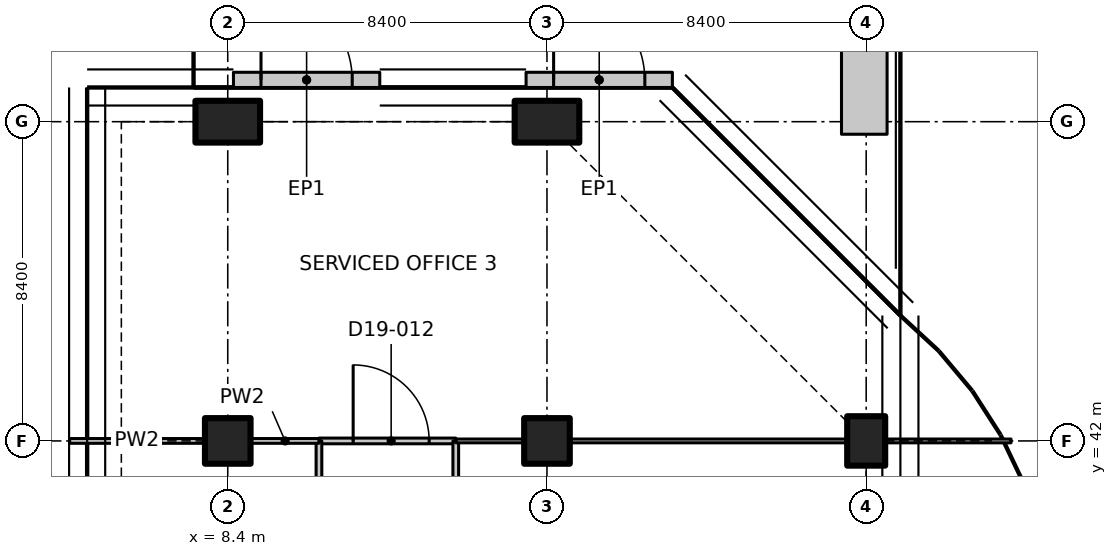
"""IFC4 building model, lengths in metres.
Left out: names, types, materials, properties, quantities, classifications, styles, units other than length and angle.
Written with IfcOpenShell. Run it as: python <this file> out.ifc"""

import sys

from ifc_helpers import new_model, si_unit, direction, frame, frame_2d, origin, origin_2d, place, context, subcontext, project, spatial, polyline, rectangle, outline, extrude, element, fill, save


model = new_model("IFC4")
c1 = context("Model", 3, precision=1e-05, world=origin(), true_north=direction((0.0, 1.0)))
c2 = subcontext(c1, "Body", "Model", "MODEL_VIEW")
j1 = project(units=[si_unit("LENGTHUNIT", "METRE"), si_unit("PLANEANGLEUNIT", "RADIAN")], contexts=[c1])
p1 = place(None, origin())
s1 = spatial("IfcSite", under=j1, at=p1, CompositionType="ELEMENT")
p2 = place(p1, origin())
s2 = spatial("IfcBuilding", under=s1, at=p2, CompositionType="ELEMENT")
p3 = place(p2, frame((0.0, 0.0, 156.5)))
s3 = spatial("IfcBuildingStorey", under=s2, at=p3, CompositionType="ELEMENT", Elevation=156.5)
p4 = place(p3, frame((8.4, 42.0, 0.0), z_axis=(0.0, 0.0, 1.0), x_axis=(1.0, 0.0, 0.0)))
e1 = element("IfcColumn", 1, at=p4, inside=s3, PredefinedType="COLUMN", context=c2, shape_type="SweptSolid", body=[
    extrude(rectangle(XDim=1.2, YDim=1.2, at=origin_2d()), origin(), (0.0, 0.0, 1.0), 5.2),
])
p5 = place(p3, frame((8.4, 50.4, 0.0), z_axis=(0.0, 0.0, 1.0), x_axis=(0.0, 1.0, 0.0)))
e2 = element("IfcColumn", 2, at=p5, inside=s3, PredefinedType="COLUMN", context=c2, shape_type="SweptSolid", body=[
    extrude(rectangle(XDim=1.1, YDim=1.7, at=origin_2d()), origin(), (0.0, 0.0, 1.0), 5.2),
])
p6 = place(p3, frame((16.8, 42.0, 0.0), z_axis=(0.0, 0.0, 1.0), x_axis=(1.0, 0.0, 0.0)))
e3 = element("IfcColumn", 3, at=p6, inside=s3, PredefinedType="COLUMN", context=c2, shape_type="SweptSolid", body=[
    extrude(rectangle(XDim=1.2, YDim=1.2, at=origin_2d()), origin(), (0.0, 0.0, 1.0), 5.2),
])
p7 = place(p3, frame((16.8, 50.4, 0.0), z_axis=(0.0, 0.0, 1.0), x_axis=(0.0, 1.0, 0.0)))
e4 = element("IfcColumn", 4, at=p7, inside=s3, PredefinedType="COLUMN", context=c2, shape_type="SweptSolid", body=[
    extrude(rectangle(XDim=1.1, YDim=1.7, at=origin_2d()), origin(), (0.0, 0.0, 1.0), 5.2),
])
p8 = place(p3, frame((25.2, 42.0, 0.0), z_axis=(0.0, 0.0, 1.0), x_axis=(1.0, 0.0, 0.0)))
e5 = element("IfcColumn", 5, at=p8, inside=s3, PredefinedType="COLUMN", context=c2, shape_type="SweptSolid", body=[
    extrude(rectangle(XDim=1.0, YDim=1.3, at=origin_2d()), origin(), (0.0, 0.0, 1.0), 5.2),
])
p9 = place(p3, frame((16.25, 51.5, 0.0), z_axis=(0.0, 0.0, 1.0), x_axis=(1.0, 0.0, 0.0)))
e6 = element("IfcWall", 6, at=p9, inside=s3, PredefinedType="SOLIDWALL", context=c2, shape_type="SweptSolid", body=[
    extrude(rectangle(XDim=3.85, YDim=0.4, at=frame_2d((1.925, 0.0))), origin(), (0.0, 0.0, 1.0), 5.2),
])
p10 = place(p9, frame((0.725, 0.0, 0.0)))
e7 = element("IfcOpeningElement", 7, at=p10, cuts=e6, PredefinedType="OPENING", context=c2, shape_type="SweptSolid", body=[
    extrude(rectangle(XDim=2.4, YDim=2.7, at=frame_2d((1.2, 1.35))), frame((0.0, 0.21, 0.0), z_axis=(0.0, -1.0, 0.0), x_axis=(1.0, 0.0, 0.0)), (0.0, 0.0, 1.0), 0.42),
])
p11 = place(p3, frame((8.55, 51.5, 0.0), z_axis=(0.0, 0.0, 1.0), x_axis=(1.0, 0.0, 0.0)))
e8 = element("IfcWall", 8, at=p11, inside=s3, PredefinedType="SOLIDWALL", context=c2, shape_type="SweptSolid", body=[
    extrude(rectangle(XDim=3.85, YDim=0.4, at=frame_2d((1.925, 0.0))), origin(), (0.0, 0.0, 1.0), 5.2),
])
p12 = place(p11, frame((0.725, 0.0, 0.0)))
e9 = element("IfcOpeningElement", 9, at=p12, cuts=e8, PredefinedType="OPENING", context=c2, shape_type="SweptSolid", body=[
    extrude(rectangle(XDim=2.4, YDim=2.7, at=frame_2d((1.2, 1.35))), frame((0.0, 0.21, 0.0), z_axis=(0.0, -1.0, 0.0), x_axis=(1.0, 0.0, 0.0)), (0.0, 0.0, 1.0), 0.42),
])
p13 = place(p3, frame((25.15, 50.07, 0.0), z_axis=(0.0, 0.0, 1.0), x_axis=(0.0, 1.0, 0.0)))
e10 = element("IfcWall", 10, at=p13, inside=s3, PredefinedType="PARAPET", context=c2, shape_type="SweptSolid", body=[
    extrude(rectangle(XDim=11.885, YDim=1.2, at=frame_2d((5.943, 0.0))), origin(), (0.0, 0.0, 1.0), 1.3),
])
p14 = place(p3, frame((10.8, 42.0, 0.0), z_axis=(0.0, 0.0, 1.0), x_axis=(1.0, 0.0, 0.0)))
e11 = element("IfcWall", 11, at=p14, inside=s3, PredefinedType="PARTITIONING", context=c2, shape_type="SweptSolid", body=[
    extrude(rectangle(XDim=3.6, YDim=0.15, at=frame_2d((1.8, 0.0))), origin(), (0.0, 0.0, 1.0), 5.18),
])
p15 = place(p14, frame((0.9, 0.0, 0.0)))
e12 = element("IfcOpeningElement", 12, at=p15, cuts=e11, PredefinedType="OPENING", context=c2, shape_type="SweptSolid", body=[
    extrude(rectangle(XDim=2.0, YDim=2.4, at=frame_2d((1.0, 1.2))), frame((0.0, 0.085, 0.0), z_axis=(0.0, -1.0, 0.0), x_axis=(1.0, 0.0, 0.0)), (0.0, 0.0, 1.0), 0.17),
])
p16 = place(p3, frame((10.8, 37.8, 0.0), z_axis=(0.0, 0.0, 1.0), x_axis=(0.0, 1.0, 0.0)))
e13 = element("IfcWall", 13, at=p16, inside=s3, PredefinedType="PARTITIONING", context=c2, shape_type="SweptSolid", body=[
    extrude(rectangle(XDim=4.2, YDim=0.15, at=frame_2d((2.1, 0.0))), origin(), (0.0, 0.0, 1.0), 5.18),
])
p17 = place(p3, frame((14.4, 42.0, 0.0), z_axis=(0.0, 0.0, 1.0), x_axis=(0.0, -1.0, 0.0)))
e14 = element("IfcWall", 14, at=p17, inside=s3, PredefinedType="PARTITIONING", context=c2, shape_type="SweptSolid", body=[
    extrude(rectangle(XDim=8.4, YDim=0.15, at=frame_2d((4.2, 0.0))), origin(), (0.0, 0.0, 1.0), 5.18),
])
p18 = place(p3, frame((10.8, 42.0, 0.0), z_axis=(0.0, 0.0, 1.0), x_axis=(-1.0, 0.0, 0.0)))
e15 = element("IfcWall", 15, at=p18, inside=s3, PredefinedType="PARTITIONING", context=c2, shape_type="SweptSolid", body=[
    extrude(rectangle(XDim=1.78, YDim=0.125, at=frame_2d((0.89, 0.0))), origin(), (0.0, 0.0, 1.0), 5.18),
])
p19 = place(p3, frame((7.78, 42.0, 0.0), z_axis=(0.0, 0.0, 1.0), x_axis=(-1.0, 0.0, 0.0)))
e16 = element("IfcWall", 16, at=p19, inside=s3, PredefinedType="PARTITIONING", context=c2, shape_type="SweptSolid", body=[
    extrude(rectangle(XDim=3.54, YDim=0.125, at=frame_2d((1.77, 0.0))), origin(), (0.0, 0.0, 1.0), 4.83),
])
p20 = place(p3, frame((29.011, 42.0, 0.0), z_axis=(0.0, 0.0, 1.0), x_axis=(-1.0, 0.0, 0.0)))
e17 = element("IfcWall", 17, at=p20, inside=s3, PredefinedType="PARTITIONING", context=c2, shape_type="SweptSolid", body=[
    extrude(rectangle(XDim=3.292, YDim=0.1, at=frame_2d((1.646, 0.0))), origin(), (0.0, 0.0, 1.0), 4.83),
])
p21 = place(p3, frame((24.68, 42.0, 0.0), z_axis=(0.0, 0.0, 1.0), x_axis=(-1.0, 0.0, 0.0)))
e18 = element("IfcWall", 18, at=p21, inside=s3, PredefinedType="PARTITIONING", context=c2, shape_type="SweptSolid", body=[
    extrude(outline(polyline([(0.0, 0.0), (7.26, 0.0), (7.26, 5.18), (0.146, 5.18), (0.144, 4.83), (0.0, 4.83), (0.0, 0.0)])), frame((0.0, 0.05, 0.0), z_axis=(0.0, -1.0, 0.0), x_axis=(1.0, 0.0, 0.0)), (0.0, 0.0, 1.0), 0.1),
])
p22 = place(p3, frame((16.18, 42.0, 0.0), z_axis=(0.0, 0.0, 1.0), x_axis=(-1.0, 0.0, 0.0)))
e19 = element("IfcWall", 19, at=p22, inside=s3, PredefinedType="PARTITIONING", context=c2, shape_type="SweptSolid", body=[
    extrude(rectangle(XDim=1.78, YDim=0.1, at=frame_2d((0.89, 0.0))), origin(), (0.0, 0.0, 1.0), 5.18),
])
p23 = place(p10, origin())
e20 = element("IfcDoor", 20, at=p23, inside=s3, OperationType="DOUBLE_DOOR_SINGLE_SWING", PredefinedType="DOOR", context=c2, shape_type="SweptSolid", body=[
    extrude(rectangle(XDim=2.4, YDim=2.7, at=frame_2d((1.2, 1.35))), frame((0.0, 0.025, 0.0), z_axis=(0.0, -1.0, 0.0), x_axis=(1.0, 0.0, 0.0)), (0.0, 0.0, 1.0), 0.05),
])
fill(e7, e20)
p24 = place(p12, origin())
e21 = element("IfcDoor", 21, at=p24, inside=s3, OperationType="DOUBLE_DOOR_SINGLE_SWING", PredefinedType="DOOR", context=c2, shape_type="SweptSolid", body=[
    extrude(rectangle(XDim=2.4, YDim=2.7, at=frame_2d((1.2, 1.35))), frame((0.0, 0.025, 0.0), z_axis=(0.0, -1.0, 0.0), x_axis=(1.0, 0.0, 0.0)), (0.0, 0.0, 1.0), 0.05),
])
fill(e9, e21)
p25 = place(p15, origin())
e22 = element("IfcDoor", 22, at=p25, inside=s3, OperationType="DOUBLE_DOOR_SINGLE_SWING", PredefinedType="DOOR", context=c2, shape_type="SweptSolid", body=[
    extrude(rectangle(XDim=2.0, YDim=2.4, at=frame_2d((1.0, 1.2))), frame((0.0, 0.025, 0.0), z_axis=(0.0, -1.0, 0.0), x_axis=(1.0, 0.0, 0.0)), (0.0, 0.0, 1.0), 0.05),
])
fill(e12, e22)
save(model, sys.argv[1])
